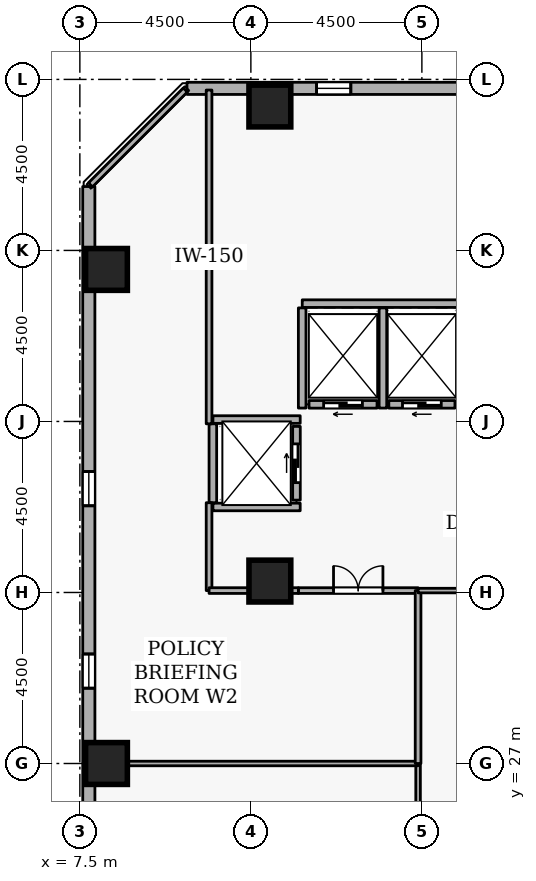
"""IFC4 building model, lengths in metres.
Left out: names, types, materials, properties, quantities, classifications, styles, units other than length and angle.
Written with IfcOpenShell. Run it as: python <this file> out.ifc"""

import sys

from ifc_helpers import new_model, si_unit, direction, frame, frame_2d, origin, origin_2d, place, context, subcontext, project, spatial, rectangle, extrude, element, fill, save


model = new_model("IFC4")
c1 = context("Model", 3, precision=1e-05, world=origin(), true_north=direction((0.0, 1.0)))
c2 = subcontext(c1, "Body", "Model", "MODEL_VIEW")
j1 = project(units=[si_unit("LENGTHUNIT", "METRE"), si_unit("PLANEANGLEUNIT", "RADIAN")], contexts=[c1])
p1 = place(None, origin())
s1 = spatial("IfcSite", under=j1, at=p1, CompositionType="ELEMENT")
p2 = place(p1, origin())
s2 = spatial("IfcBuilding", under=s1, at=p2, CompositionType="ELEMENT")
p3 = place(p2, frame((0.0, 0.0, 163.5)))
s3 = spatial("IfcBuildingStorey", under=s2, at=p3, CompositionType="ELEMENT", Elevation=163.5)
for number, where, z_axis, x_axis in (
    (1, (12.5, 44.3, 0.0), (0.0, 0.0, 1.0), (1.0, 0.0, 0.0)),
    (2, (8.2, 27.0, 0.0), (0.0, 0.0, 1.0), (1.0, 0.0, 0.0)),
    (3, (8.2, 40.0, 0.0), (0.0, 0.0, 1.0), (1.0, 0.0, 0.0)),
    (4, (12.5, 31.8, 0.0), (0.0, 0.0, 1.0), (1.0, 0.0, 0.0)),
):
    element("IfcColumn", number, at=place(p3, frame(where, z_axis=z_axis, x_axis=x_axis)), inside=s3, PredefinedType="COLUMN", context=c2, shape_type="SweptSolid", body=[
        extrude(rectangle(XDim=1.1, YDim=1.1, at=origin_2d()), origin(), (0.0, 0.0, 1.0), 3.6),
    ])
p4 = place(p3, frame((46.129, 44.763, 0.0), z_axis=(0.0, 0.0, 1.0), x_axis=(-0.999999998513, 5.4540124e-05, 0.0)))
e5 = element("IfcWall", 5, at=p4, inside=s3, PredefinedType="STANDARD", context=c2, shape_type="SweptSolid", body=[
    extrude(rectangle(XDim=35.811, YDim=0.32, at=frame_2d((17.905, 0.0))), origin(), (0.0, 0.0, 1.0), 2.7),
])
p5 = place(p4, frame((2.7, 0.0, 0.72)))
e6 = element("IfcOpeningElement", 6, at=p5, cuts=e5, PredefinedType="OPENING", context=c2, shape_type="SweptSolid", body=[
    extrude(rectangle(XDim=0.9, YDim=1.75, at=frame_2d((0.45, 0.875))), frame((0.0, 0.17, 0.0), z_axis=(0.0, -1.0, 0.0), x_axis=(1.0, 0.0, 0.0)), (0.0, 0.0, 1.0), 0.34),
])
p6 = place(p4, frame((12.3, 0.0, 0.72)))
e7 = element("IfcOpeningElement", 7, at=p6, cuts=e5, PredefinedType="OPENING", context=c2, shape_type="SweptSolid", body=[
    extrude(rectangle(XDim=0.9, YDim=1.75, at=frame_2d((0.45, 0.875))), frame((0.0, 0.17, 0.0), z_axis=(0.0, -1.0, 0.0), x_axis=(1.0, 0.0, 0.0)), (0.0, 0.0, 1.0), 0.34),
])
p7 = place(p4, frame((17.1, 0.0, 0.72)))
e8 = element("IfcOpeningElement", 8, at=p7, cuts=e5, PredefinedType="OPENING", context=c2, shape_type="SweptSolid", body=[
    extrude(rectangle(XDim=0.9, YDim=1.75, at=frame_2d((0.45, 0.875))), frame((0.0, 0.17, 0.0), z_axis=(0.0, -1.0, 0.0), x_axis=(1.0, 0.0, 0.0)), (0.0, 0.0, 1.0), 0.34),
])
p8 = place(p4, frame((21.9, 0.0, 0.72)))
e9 = element("IfcOpeningElement", 9, at=p8, cuts=e5, PredefinedType="OPENING", context=c2, shape_type="SweptSolid", body=[
    extrude(rectangle(XDim=0.9, YDim=1.75, at=frame_2d((0.45, 0.875))), frame((0.0, 0.17, 0.0), z_axis=(0.0, -1.0, 0.0), x_axis=(1.0, 0.0, 0.0)), (0.0, 0.0, 1.0), 0.34),
])
p9 = place(p4, frame((26.7, 0.0, 0.72)))
e10 = element("IfcOpeningElement", 10, at=p9, cuts=e5, PredefinedType="OPENING", context=c2, shape_type="SweptSolid", body=[
    extrude(rectangle(XDim=0.9, YDim=1.75, at=frame_2d((0.45, 0.875))), frame((0.0, 0.17, 0.0), z_axis=(0.0, -1.0, 0.0), x_axis=(1.0, 0.0, 0.0)), (0.0, 0.0, 1.0), 0.34),
])
p10 = place(p4, frame((31.5, 0.0, 0.72)))
e11 = element("IfcOpeningElement", 11, at=p10, cuts=e5, PredefinedType="OPENING", context=c2, shape_type="SweptSolid", body=[
    extrude(rectangle(XDim=0.9, YDim=1.75, at=frame_2d((0.45, 0.875))), frame((0.0, 0.17, 0.0), z_axis=(0.0, -1.0, 0.0), x_axis=(1.0, 0.0, 0.0)), (0.0, 0.0, 1.0), 0.34),
])
p11 = place(p3, frame((7.735, 42.181, 0.0), z_axis=(0.0, 0.0, 1.0), x_axis=(5.4540124e-05, -0.999999998513, 0.0)))
e12 = element("IfcWall", 12, at=p11, inside=s3, PredefinedType="STANDARD", context=c2, shape_type="SweptSolid", body=[
    extrude(rectangle(XDim=35.811, YDim=0.32, at=frame_2d((17.905, 0.0))), origin(), (0.0, 0.0, 1.0), 2.7),
])
p12 = place(p11, frame((7.5, 0.0, 0.72)))
e13 = element("IfcOpeningElement", 13, at=p12, cuts=e12, PredefinedType="OPENING", context=c2, shape_type="SweptSolid", body=[
    extrude(rectangle(XDim=0.9, YDim=1.75, at=frame_2d((0.45, 0.875))), frame((0.0, 0.17, 0.0), z_axis=(0.0, -1.0, 0.0), x_axis=(1.0, 0.0, 0.0)), (0.0, 0.0, 1.0), 0.34),
])
p13 = place(p11, frame((12.3, 0.0, 0.72)))
e14 = element("IfcOpeningElement", 14, at=p13, cuts=e12, PredefinedType="OPENING", context=c2, shape_type="SweptSolid", body=[
    extrude(rectangle(XDim=0.9, YDim=1.75, at=frame_2d((0.45, 0.875))), frame((0.0, 0.17, 0.0), z_axis=(0.0, -1.0, 0.0), x_axis=(1.0, 0.0, 0.0)), (0.0, 0.0, 1.0), 0.34),
])
p14 = place(p11, frame((17.1, 0.0, 0.72)))
e15 = element("IfcOpeningElement", 15, at=p14, cuts=e12, PredefinedType="OPENING", context=c2, shape_type="SweptSolid", body=[
    extrude(rectangle(XDim=0.9, YDim=1.75, at=frame_2d((0.45, 0.875))), frame((0.0, 0.17, 0.0), z_axis=(0.0, -1.0, 0.0), x_axis=(1.0, 0.0, 0.0)), (0.0, 0.0, 1.0), 0.34),
])
p15 = place(p11, frame((21.9, 0.0, 0.72)))
e16 = element("IfcOpeningElement", 16, at=p15, cuts=e12, PredefinedType="OPENING", context=c2, shape_type="SweptSolid", body=[
    extrude(rectangle(XDim=0.9, YDim=1.75, at=frame_2d((0.45, 0.875))), frame((0.0, 0.17, 0.0), z_axis=(0.0, -1.0, 0.0), x_axis=(1.0, 0.0, 0.0)), (0.0, 0.0, 1.0), 0.34),
])
p16 = place(p11, frame((31.5, 0.0, 0.72)))
e17 = element("IfcOpeningElement", 17, at=p16, cuts=e12, PredefinedType="OPENING", context=c2, shape_type="SweptSolid", body=[
    extrude(rectangle(XDim=0.9, YDim=1.75, at=frame_2d((0.45, 0.875))), frame((0.0, 0.17, 0.0), z_axis=(0.0, -1.0, 0.0), x_axis=(1.0, 0.0, 0.0)), (0.0, 0.0, 1.0), 0.34),
])
p17 = place(p3, frame((17.37, 36.45, 0.0), z_axis=(0.0, 0.0, 1.0), x_axis=(-1.0, 0.0, 0.0)))
e18 = element("IfcWall", 18, at=p17, inside=s3, PredefinedType="STANDARD", context=c2, shape_type="SweptSolid", body=[
    extrude(rectangle(XDim=1.74, YDim=0.2, at=frame_2d((0.87, 0.0))), origin(), (0.0, 0.0, 1.0), 3.34),
])
p18 = place(p17, frame((0.36, 0.0, 0.0)))
e19 = element("IfcOpeningElement", 19, at=p18, cuts=e18, PredefinedType="OPENING", context=c2, shape_type="SweptSolid", body=[
    extrude(rectangle(XDim=1.02, YDim=2.06, at=frame_2d((0.51, 1.03))), frame((0.0, 0.11, 0.0), z_axis=(0.0, -1.0, 0.0), x_axis=(1.0, 0.0, 0.0)), (0.0, 0.0, 1.0), 0.22),
])
p19 = place(p3, frame((15.32, 36.45, 0.0), z_axis=(0.0, 0.0, 1.0), x_axis=(-1.0, 0.0, 0.0)))
e20 = element("IfcWall", 20, at=p19, inside=s3, PredefinedType="STANDARD", context=c2, shape_type="SweptSolid", body=[
    extrude(rectangle(XDim=1.79, YDim=0.2, at=frame_2d((0.895, 0.0))), origin(), (0.0, 0.0, 1.0), 3.34),
])
p20 = place(p19, frame((0.385, 0.0, 0.0)))
e21 = element("IfcOpeningElement", 21, at=p20, cuts=e20, PredefinedType="OPENING", context=c2, shape_type="SweptSolid", body=[
    extrude(rectangle(XDim=1.02, YDim=2.06, at=frame_2d((0.51, 1.03))), frame((0.0, 0.11, 0.0), z_axis=(0.0, -1.0, 0.0), x_axis=(1.0, 0.0, 0.0)), (0.0, 0.0, 1.0), 0.22),
])
p21 = place(p3, frame((13.2, 33.93, 0.0), z_axis=(0.0, 0.0, 1.0), x_axis=(0.0, 1.0, 0.0)))
e22 = element("IfcWall", 22, at=p21, inside=s3, PredefinedType="STANDARD", context=c2, shape_type="SweptSolid", body=[
    extrude(rectangle(XDim=1.94, YDim=0.2, at=frame_2d((0.97, 0.0))), origin(), (0.0, 0.0, 1.0), 3.34),
])
p22 = place(p21, frame((0.46, 0.0, 0.0)))
e23 = element("IfcOpeningElement", 23, at=p22, cuts=e22, PredefinedType="OPENING", context=c2, shape_type="SweptSolid", body=[
    extrude(rectangle(XDim=1.02, YDim=2.06, at=frame_2d((0.51, 1.03))), frame((0.0, 0.11, 0.0), z_axis=(0.0, -1.0, 0.0), x_axis=(1.0, 0.0, 0.0)), (0.0, 0.0, 1.0), 0.22),
])
p23 = place(p3, frame((13.352, 39.1, 0.0), z_axis=(0.0, 0.0, 1.0), x_axis=(1.0, 0.0, 0.0)))
e24 = element("IfcWall", 24, at=p23, inside=s3, PredefinedType="STANDARD", context=c2, shape_type="SweptSolid", body=[
    extrude(rectangle(XDim=4.196, YDim=0.2, at=frame_2d((2.098, 0.0))), origin(), (0.0, 0.0, 1.0), 3.34),
])
for number, where, z_axis, x_axis in (
    (25, (15.475, 36.352, 0.0), (0.0, 0.0, 1.0), (0.0, 1.0, 0.0)),
    (26, (13.35, 36.352, 0.0), (0.0, 0.0, 1.0), (0.0, 1.0, 0.0)),
):
    element("IfcWall", number, at=place(p3, frame(where, z_axis=z_axis, x_axis=x_axis)), inside=s3, PredefinedType="STANDARD", context=c2, shape_type="SweptSolid", body=[
        extrude(rectangle(XDim=2.636, YDim=0.2, at=frame_2d((1.318, 0.0))), origin(), (0.0, 0.0, 1.0), 3.34),
    ])
for number, where, z_axis, x_axis in (
    (27, (11.002, 36.05, 0.0), (0.0, 0.0, 1.0), (1.0, 0.0, 0.0)),
    (28, (11.002, 33.75, 0.0), (0.0, 0.0, 1.0), (1.0, 0.0, 0.0)),
):
    element("IfcWall", number, at=place(p3, frame(where, z_axis=z_axis, x_axis=x_axis)), inside=s3, PredefinedType="STANDARD", context=c2, shape_type="SweptSolid", body=[
        extrude(rectangle(XDim=2.296, YDim=0.2, at=frame_2d((1.148, 0.0))), origin(), (0.0, 0.0, 1.0), 3.34),
    ])
p24 = place(p3, frame((11.0, 33.862, 0.0), z_axis=(0.0, 0.0, 1.0), x_axis=(0.0, 1.0, 0.0)))
e29 = element("IfcWall", 29, at=p24, inside=s3, PredefinedType="STANDARD", context=c2, shape_type="SweptSolid", body=[
    extrude(rectangle(XDim=2.076, YDim=0.2, at=frame_2d((1.038, 0.0))), origin(), (0.0, 0.0, 1.0), 3.34),
])
p25 = place(p3, frame((16.4, 27.0, 0.0), z_axis=(0.0, 0.0, 1.0), x_axis=(0.0, -1.0, 0.0)))
e30 = element("IfcWall", 30, at=p25, inside=s3, PredefinedType="PARTITIONING", context=c2, shape_type="SweptSolid", body=[
    extrude(rectangle(XDim=4.55, YDim=0.12, at=frame_2d((2.275, 0.0))), origin(), (0.0, 0.0, 1.0), 3.34),
])
p26 = place(p3, frame((7.78, 27.0, 0.0), z_axis=(0.0, 0.0, 1.0), x_axis=(1.0, 0.0, 0.0)))
e31 = element("IfcWall", 31, at=p26, inside=s3, PredefinedType="PARTITIONING", context=c2, shape_type="SweptSolid", body=[
    extrude(rectangle(XDim=8.62, YDim=0.12, at=frame_2d((4.31, 0.0))), origin(), (0.0, 0.0, 1.0), 2.878),
])
p27 = place(p3, frame((13.25, 31.55, 0.0), z_axis=(0.0, 0.0, 1.0), x_axis=(1.0, 0.0, 0.0)))
e32 = element("IfcWall", 32, at=p27, inside=s3, PredefinedType="PARTITIONING", context=c2, shape_type="SweptSolid", body=[
    extrude(rectangle(XDim=3.15, YDim=0.15, at=frame_2d((1.575, 0.0))), origin(), (0.0, 0.0, 1.0), 3.34),
])
p28 = place(p27, frame((0.925, 0.0, 0.0)))
e33 = element("IfcOpeningElement", 33, at=p28, cuts=e32, PredefinedType="OPENING", context=c2, shape_type="SweptSolid", body=[
    extrude(rectangle(XDim=1.3, YDim=2.12, at=frame_2d((0.65, 1.06))), frame((0.0, 0.085, 0.0), z_axis=(0.0, -1.0, 0.0), x_axis=(1.0, 0.0, 0.0)), (0.0, 0.0, 1.0), 0.17),
])
p29 = place(p3, frame((16.4, 31.55, 0.0), z_axis=(0.0, 0.0, 1.0), x_axis=(0.0, -1.0, 0.0)))
e34 = element("IfcWall", 34, at=p29, inside=s3, PredefinedType="PARTITIONING", context=c2, shape_type="SweptSolid", body=[
    extrude(rectangle(XDim=4.55, YDim=0.15, at=frame_2d((2.275, 0.0))), origin(), (0.0, 0.0, 1.0), 3.34),
])
p30 = place(p3, frame((7.78, 42.225, 0.0), z_axis=(0.0, 0.0, 1.0), x_axis=(0.707106781187, 0.707106781187, 0.0)))
e35 = element("IfcWall", 35, at=p30, inside=s3, PredefinedType="PARTITIONING", context=c2, shape_type="SweptSolid", body=[
    extrude(rectangle(XDim=3.528, YDim=0.15, at=frame_2d((1.764, 0.0))), origin(), (0.0, 0.0, 1.0), 3.34),
])
p31 = place(p3, frame((10.9, 44.72, 0.0), z_axis=(0.0, 0.0, 1.0), x_axis=(0.0, -1.0, 0.0)))
e36 = element("IfcWall", 36, at=p31, inside=s3, PredefinedType="PARTITIONING", context=c2, shape_type="SweptSolid", body=[
    extrude(rectangle(XDim=8.782, YDim=0.15, at=frame_2d((4.391, 0.0))), origin(), (0.0, 0.0, 1.0), 3.34),
])
p32 = place(p3, frame((10.9, 33.862, 0.0), z_axis=(0.0, 0.0, 1.0), x_axis=(0.0, -1.0, 0.0)))
e37 = element("IfcWall", 37, at=p32, inside=s3, PredefinedType="PARTITIONING", context=c2, shape_type="SweptSolid", body=[
    extrude(rectangle(XDim=2.312, YDim=0.15, at=frame_2d((1.156, 0.0))), origin(), (0.0, 0.0, 1.0), 3.34),
])
p33 = place(p3, frame((10.9, 31.55, 0.0), z_axis=(0.0, 0.0, 1.0), x_axis=(1.0, 0.0, 0.0)))
e38 = element("IfcWall", 38, at=p33, inside=s3, PredefinedType="PARTITIONING", context=c2, shape_type="SweptSolid", body=[
    extrude(rectangle(XDim=2.35, YDim=0.15, at=frame_2d((1.175, 0.0))), origin(), (0.0, 0.0, 1.0), 3.34),
])
p34 = place(p3, frame((16.4, 31.55, 0.0), z_axis=(0.0, 0.0, 1.0), x_axis=(1.0, 0.0, 0.0)))
e39 = element("IfcWall", 39, at=p34, inside=s3, PredefinedType="PARTITIONING", context=c2, shape_type="SweptSolid", body=[
    extrude(rectangle(XDim=4.5, YDim=0.12, at=frame_2d((2.25, 0.0))), origin(), (0.0, 0.0, 1.0), 3.34),
])
p35 = place(p34, frame((1.775, 0.0, 0.0)))
e40 = element("IfcOpeningElement", 40, at=p35, cuts=e39, PredefinedType="OPENING", context=c2, shape_type="SweptSolid", body=[
    extrude(rectangle(XDim=0.95, YDim=2.1, at=frame_2d((0.475, 1.05))), frame((0.0, 0.07, 0.0), z_axis=(0.0, -1.0, 0.0), x_axis=(1.0, 0.0, 0.0)), (0.0, 0.0, 1.0), 0.14),
])
p36 = place(p10, origin())
e41 = element("IfcWindow", 41, at=p36, inside=s3, PartitioningType="SINGLE_PANEL", PredefinedType="WINDOW", context=c2, shape_type="SweptSolid", body=[
    extrude(rectangle(XDim=0.9, YDim=1.75, at=frame_2d((0.45, 0.875))), frame((0.0, 0.03, 0.0), z_axis=(0.0, -1.0, 0.0), x_axis=(1.0, 0.0, 0.0)), (0.0, 0.0, 1.0), 0.06),
])
fill(e11, e41)
p37 = place(p12, origin())
e42 = element("IfcWindow", 42, at=p37, inside=s3, PartitioningType="SINGLE_PANEL", PredefinedType="WINDOW", context=c2, shape_type="SweptSolid", body=[
    extrude(rectangle(XDim=0.9, YDim=1.75, at=frame_2d((0.45, 0.875))), frame((0.0, 0.03, 0.0), z_axis=(0.0, -1.0, 0.0), x_axis=(1.0, 0.0, 0.0)), (0.0, 0.0, 1.0), 0.06),
])
fill(e13, e42)
p38 = place(p13, origin())
e43 = element("IfcWindow", 43, at=p38, inside=s3, PartitioningType="SINGLE_PANEL", PredefinedType="WINDOW", context=c2, shape_type="SweptSolid", body=[
    extrude(rectangle(XDim=0.9, YDim=1.75, at=frame_2d((0.45, 0.875))), frame((0.0, 0.03, 0.0), z_axis=(0.0, -1.0, 0.0), x_axis=(1.0, 0.0, 0.0)), (0.0, 0.0, 1.0), 0.06),
])
fill(e14, e43)
p39 = place(p18, origin())
e44 = element("IfcDoor", 44, at=p39, inside=s3, OperationType="SLIDING_TO_LEFT", PredefinedType="DOOR", context=c2, shape_type="SweptSolid", body=[
    extrude(rectangle(XDim=1.02, YDim=2.06, at=frame_2d((0.51, 1.03))), frame((0.0, 0.025, 0.0), z_axis=(0.0, -1.0, 0.0), x_axis=(1.0, 0.0, 0.0)), (0.0, 0.0, 1.0), 0.05),
])
fill(e19, e44)
p40 = place(p20, origin())
e45 = element("IfcDoor", 45, at=p40, inside=s3, OperationType="SLIDING_TO_LEFT", PredefinedType="DOOR", context=c2, shape_type="SweptSolid", body=[
    extrude(rectangle(XDim=1.02, YDim=2.06, at=frame_2d((0.51, 1.03))), frame((0.0, 0.025, 0.0), z_axis=(0.0, -1.0, 0.0), x_axis=(1.0, 0.0, 0.0)), (0.0, 0.0, 1.0), 0.05),
])
fill(e21, e45)
p41 = place(p22, origin())
e46 = element("IfcDoor", 46, at=p41, inside=s3, OperationType="SLIDING_TO_LEFT", PredefinedType="DOOR", context=c2, shape_type="SweptSolid", body=[
    extrude(rectangle(XDim=1.02, YDim=2.06, at=frame_2d((0.51, 1.03))), frame((0.0, 0.025, 0.0), z_axis=(0.0, -1.0, 0.0), x_axis=(1.0, 0.0, 0.0)), (0.0, 0.0, 1.0), 0.05),
])
fill(e23, e46)
p42 = place(p28, origin())
e47 = element("IfcDoor", 47, at=p42, inside=s3, OperationType="DOUBLE_DOOR_SINGLE_SWING", PredefinedType="DOOR", context=c2, shape_type="SweptSolid", body=[
    extrude(rectangle(XDim=1.3, YDim=2.12, at=frame_2d((0.65, 1.06))), frame((0.0, 0.025, 0.0), z_axis=(0.0, -1.0, 0.0), x_axis=(1.0, 0.0, 0.0)), (0.0, 0.0, 1.0), 0.05),
])
fill(e33, e47)
save(model, sys.argv[1])
